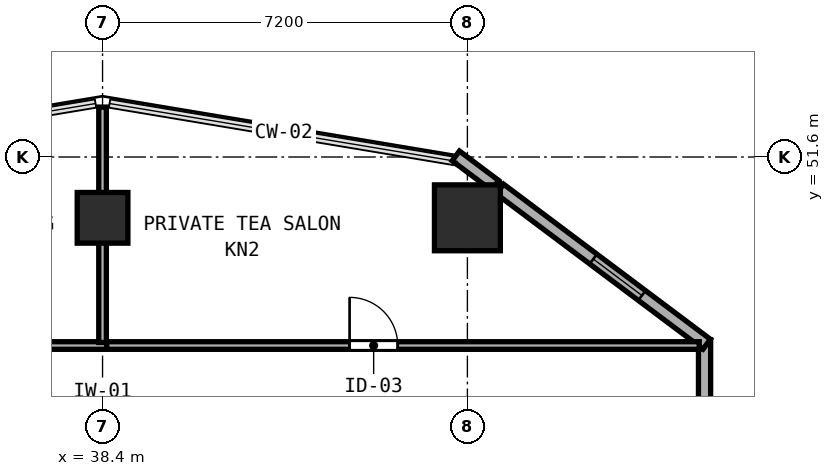
"""IFC4 building model, lengths in metres.
Left out: names, types, materials, properties, quantities, classifications, styles, units other than length and angle.
Written with IfcOpenShell. Run it as: python <this file> out.ifc"""

import sys

from ifc_helpers import new_model, si_unit, direction, frame, frame_2d, origin, origin_2d, place, context, subcontext, project, spatial, rectangle, hollow_rectangle, extrude, element, fill, save


model = new_model("IFC4")
c1 = context("Model", 3, precision=1e-05, world=origin(), true_north=direction((0.0, 1.0)))
c2 = subcontext(c1, "Body", "Model", "MODEL_VIEW")
j1 = project(units=[si_unit("LENGTHUNIT", "METRE"), si_unit("PLANEANGLEUNIT", "RADIAN")], contexts=[c1])
p1 = place(None, origin())
s1 = spatial("IfcSite", under=j1, at=p1, CompositionType="ELEMENT")
p2 = place(p1, origin())
s2 = spatial("IfcBuilding", under=s1, at=p2, CompositionType="ELEMENT")
p3 = place(p2, frame((0.0, 0.0, 31.6)))
s3 = spatial("IfcBuildingStorey", under=s2, at=p3, CompositionType="ELEMENT", Elevation=31.6)
p4 = place(p3, frame((45.6, 50.4, 0.0), z_axis=(0.0, 0.0, 1.0), x_axis=(1.0, 0.0, 0.0)))
e1 = element("IfcColumn", 1, at=p4, inside=s3, PredefinedType="COLUMN", context=c2, shape_type="SweptSolid", body=[
    extrude(hollow_rectangle(XDim=1.3, YDim=1.3, WallThickness=0.048, at=origin_2d()), origin(), (0.0, 0.0, 1.0), 3.8),
])
p5 = place(p3, frame((38.4, 50.4, 0.0), z_axis=(0.0, 0.0, 1.0), x_axis=(1.0, 0.0, 0.0)))
e2 = element("IfcColumn", 2, at=p5, inside=s3, PredefinedType="COLUMN", context=c2, shape_type="SweptSolid", body=[
    extrude(hollow_rectangle(XDim=1.0, YDim=1.0, WallThickness=0.038, at=origin_2d()), origin(), (0.0, 0.0, 1.0), 3.8),
])
p6 = place(p3, frame((50.28, 46.625, 0.0), z_axis=(0.0, 0.0, 1.0), x_axis=(0.0, 1.0, 0.0)))
e3 = element("IfcWall", 3, at=p6, inside=s3, PredefinedType="SOLIDWALL", context=c2, shape_type="SweptSolid", body=[
    extrude(rectangle(XDim=1.37, YDim=0.24, at=frame_2d((0.685, 0.0))), origin(), (0.0, 0.0, 1.0), 3.6),
])
p7 = place(p3, frame((50.324, 47.907, 0.0), z_axis=(0.0, 0.0, 1.0), x_axis=(-0.8, 0.6, 0.0)))
e4 = element("IfcWall", 4, at=p7, inside=s3, PredefinedType="SOLIDWALL", context=c2, shape_type="SweptSolid", body=[
    extrude(rectangle(XDim=5.103, YDim=0.24, at=frame_2d((2.551, 0.0))), origin(), (0.0, 0.0, 1.0), 3.6),
])
p8 = place(p7, frame((1.6, 0.0, 0.85)))
e5 = element("IfcOpeningElement", 5, at=p8, cuts=e4, PredefinedType="OPENING", context=c2, shape_type="SweptSolid", body=[
    extrude(rectangle(XDim=1.2, YDim=1.85, at=frame_2d((0.6, 0.925))), frame((0.0, 0.13, 0.0), z_axis=(0.0, -1.0, 0.0), x_axis=(1.0, 0.0, 0.0)), (0.0, 0.0, 1.0), 0.26),
])
p9 = place(p3, frame((46.144, 51.042, 0.0), z_axis=(0.0, 0.0, 1.0), x_axis=(-0.8, 0.6, 0.0)))
e6 = element("IfcWall", 6, at=p9, inside=s3, PredefinedType="SOLIDWALL", context=c2, shape_type="SweptSolid", body=[
    extrude(rectangle(XDim=0.966, YDim=0.24, at=frame_2d((0.483, 0.0))), origin(), (0.0, 0.0, 1.0), 3.6),
])
p10 = place(p3, frame((26.625, 47.88, 0.0), z_axis=(0.0, 0.0, 1.0), x_axis=(1.0, 0.0, 0.0)))
e7 = element("IfcWall", 7, at=p10, inside=s3, PredefinedType="PARTITIONING", context=c2, shape_type="SweptSolid", body=[
    extrude(rectangle(XDim=11.855, YDim=0.15, at=frame_2d((5.927, 0.0))), origin(), (0.0, 0.0, 1.0), 3.6),
])
p11 = place(p10, frame((5.87, 0.0, 0.0)))
e8 = element("IfcOpeningElement", 8, at=p11, cuts=e7, PredefinedType="OPENING", context=c2, shape_type="SweptSolid", body=[
    extrude(rectangle(XDim=0.95, YDim=2.12, at=frame_2d((0.475, 1.06))), frame((0.0, 0.085, 0.0), z_axis=(0.0, -1.0, 0.0), x_axis=(1.0, 0.0, 0.0)), (0.0, 0.0, 1.0), 0.17),
])
p12 = place(p3, frame((38.4, 47.94, 0.0), z_axis=(0.0, 0.0, 1.0), x_axis=(0.0, 1.0, 0.0)))
e9 = element("IfcWall", 9, at=p12, inside=s3, PredefinedType="PARTITIONING", context=c2, shape_type="SweptSolid", body=[
    extrude(rectangle(XDim=4.645, YDim=0.15, at=frame_2d((2.323, 0.0))), origin(), (0.0, 0.0, 1.0), 3.6),
])
p13 = place(p3, frame((38.482, 47.88, 0.0), z_axis=(0.0, 0.0, 1.0), x_axis=(1.0, 0.0, 0.0)))
e10 = element("IfcWall", 10, at=p13, inside=s3, PredefinedType="PARTITIONING", context=c2, shape_type="SweptSolid", body=[
    extrude(rectangle(XDim=11.693, YDim=0.15, at=frame_2d((5.847, 0.0))), origin(), (0.0, 0.0, 1.0), 3.6),
])
p14 = place(p13, frame((4.793, 0.0, 0.0)))
e11 = element("IfcOpeningElement", 11, at=p14, cuts=e10, PredefinedType="OPENING", context=c2, shape_type="SweptSolid", body=[
    extrude(rectangle(XDim=0.95, YDim=2.12, at=frame_2d((0.475, 1.06))), frame((0.0, 0.085, 0.0), z_axis=(0.0, -1.0, 0.0), x_axis=(1.0, 0.0, 0.0)), (0.0, 0.0, 1.0), 0.17),
])
p15 = place(p8, origin())
e12 = element("IfcWindow", 12, at=p15, inside=s3, PartitioningType="SINGLE_PANEL", PredefinedType="WINDOW", context=c2, shape_type="SweptSolid", body=[
    extrude(rectangle(XDim=1.2, YDim=1.85, at=frame_2d((0.6, 0.925))), frame((0.0, 0.03, 0.0), z_axis=(0.0, -1.0, 0.0), x_axis=(1.0, 0.0, 0.0)), (0.0, 0.0, 1.0), 0.06),
])
fill(e5, e12)
p16 = place(p14, origin())
e13 = element("IfcDoor", 13, at=p16, inside=s3, OperationType="SINGLE_SWING_LEFT", PredefinedType="DOOR", context=c2, shape_type="SweptSolid", body=[
    extrude(rectangle(XDim=0.95, YDim=2.12, at=frame_2d((0.475, 1.06))), frame((0.0, 0.025, 0.0), z_axis=(0.0, -1.0, 0.0), x_axis=(1.0, 0.0, 0.0)), (0.0, 0.0, 1.0), 0.05),
])
fill(e11, e13)
save(model, sys.argv[1])
